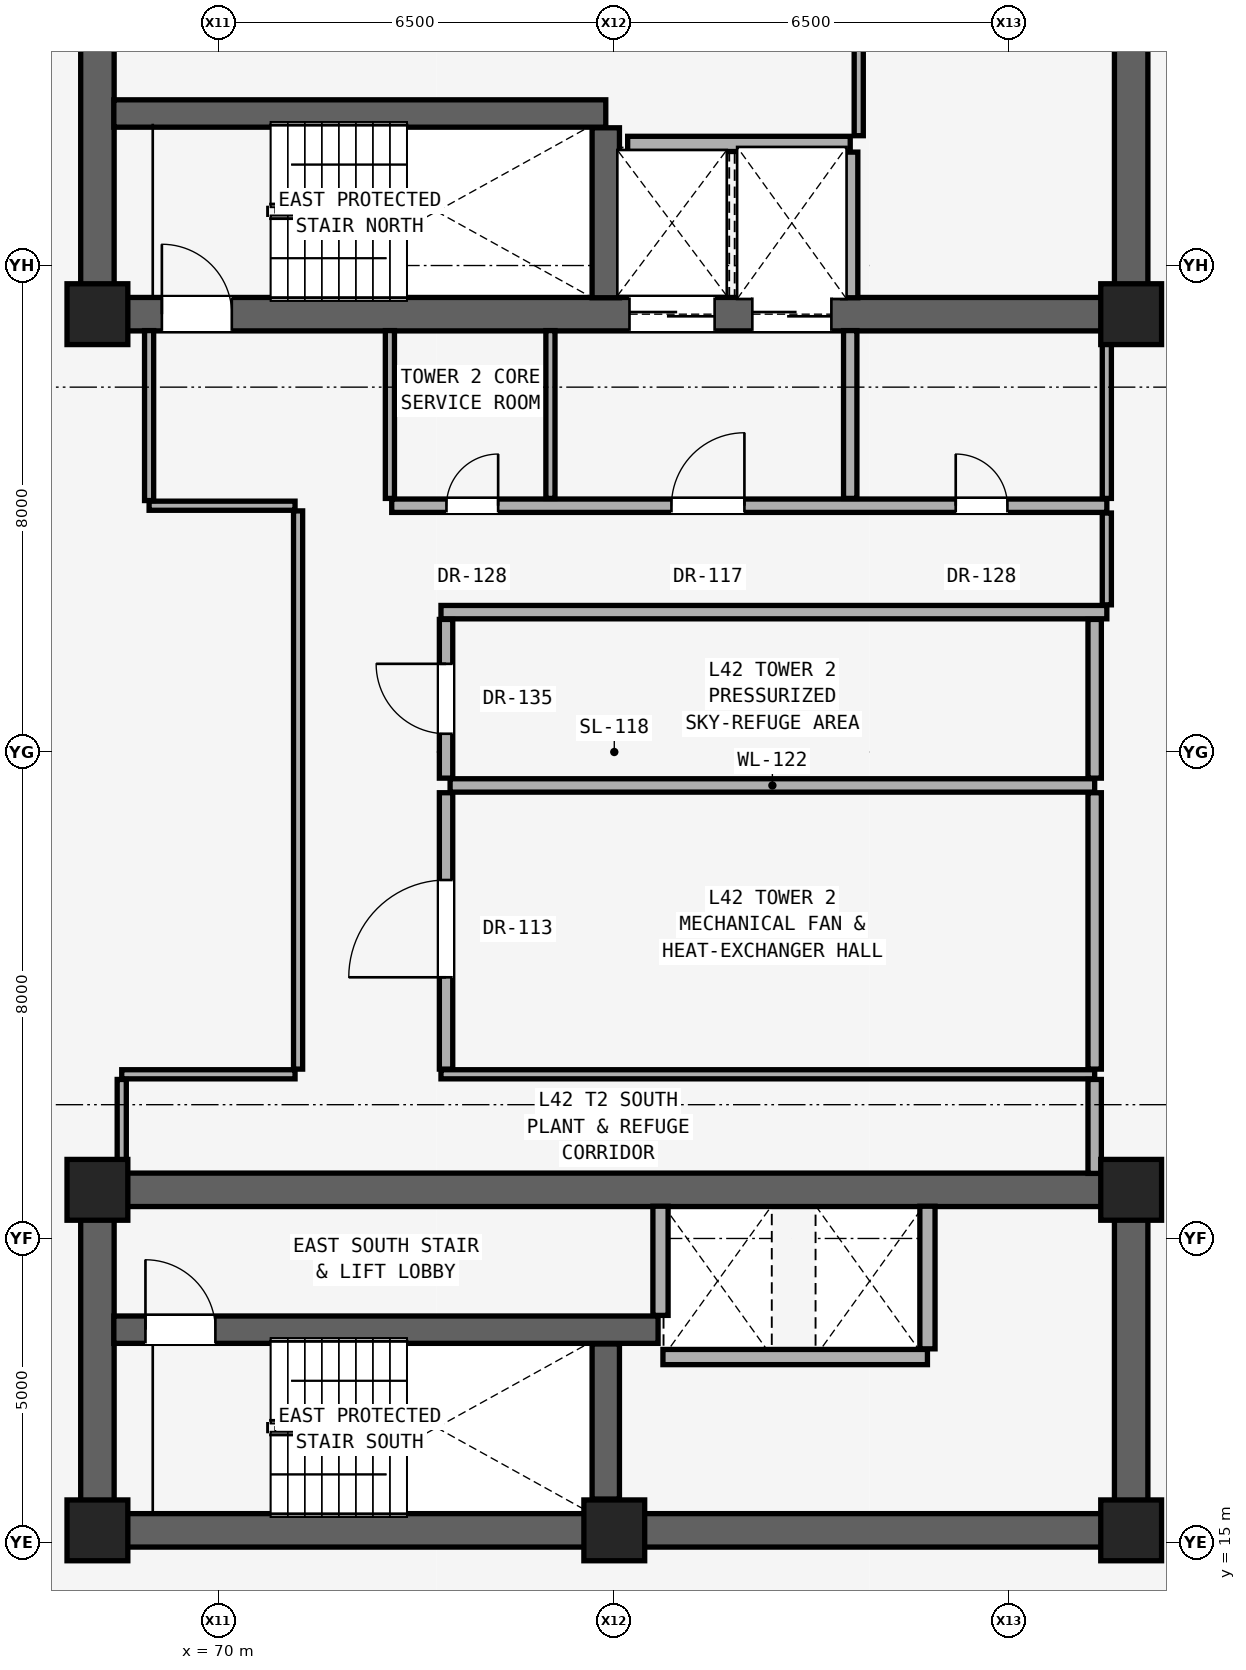
"""IFC4 building model, lengths in metres.
Left out: names, types, materials, properties, quantities, classifications, styles, units other than length and angle.
Written with IfcOpenShell. Run it as: python <this file> out.ifc"""

import sys

from ifc_helpers import new_model, si_unit, direction, frame, frame_2d, origin, origin_2d, place, context, subcontext, project, spatial, rectangle, extrude, element, fill, save


model = new_model("IFC4")
c1 = context("Model", 3, precision=1e-05, world=origin(), true_north=direction((0.0, 1.0)))
c2 = subcontext(c1, "Body", "Model", "MODEL_VIEW")
j1 = project(units=[si_unit("LENGTHUNIT", "METRE"), si_unit("PLANEANGLEUNIT", "RADIAN")], contexts=[c1])
p1 = place(None, origin())
s1 = spatial("IfcSite", under=j1, at=p1, CompositionType="ELEMENT")
p2 = place(p1, origin())
s2 = spatial("IfcBuilding", under=s1, at=p2, CompositionType="ELEMENT")
p3 = place(p2, frame((0.0, 0.0, 147.8)))
s3 = spatial("IfcBuildingStorey", under=s2, at=p3, CompositionType="ELEMENT", Elevation=147.8)
for number, where, z_axis, x_axis in (
    (1, (68.0, 15.2, 0.0), (0.0, 0.0, 1.0), (1.0, 0.0, 0.0)),
    (2, (76.5, 15.2, 0.0), (0.0, 0.0, 1.0), (1.0, 0.0, 0.0)),
    (3, (85.0, 15.2, 0.0), (0.0, 0.0, 1.0), (1.0, 0.0, 0.0)),
    (4, (68.0, 20.8, 0.0), (0.0, 0.0, 1.0), (1.0, 0.0, 0.0)),
    (5, (85.0, 20.8, 0.0), (0.0, 0.0, 1.0), (1.0, 0.0, 0.0)),
    (6, (68.0, 35.2, 0.0), (0.0, 0.0, 1.0), (1.0, 0.0, 0.0)),
    (7, (85.0, 35.2, 0.0), (0.0, 0.0, 1.0), (1.0, 0.0, 0.0)),
):
    element("IfcColumn", number, at=place(p3, frame(where, z_axis=z_axis, x_axis=x_axis)), inside=s3, PredefinedType="COLUMN", context=c2, shape_type="SweptSolid", body=[
        extrude(rectangle(XDim=1.0, YDim=1.0, at=origin_2d()), origin(), (0.0, 0.0, 1.0), 6.6),
    ])
for number, where, z_axis, x_axis in (
    (8, (68.0, 35.2, 0.0), (0.0, 0.0, 1.0), (0.0, 1.0, 0.0)),
    (9, (85.0, 35.2, 0.0), (0.0, 0.0, 1.0), (0.0, 1.0, 0.0)),
):
    element("IfcWall", number, at=place(p3, frame(where, z_axis=z_axis, x_axis=x_axis)), inside=s3, PredefinedType="SHEAR", context=c2, shape_type="SweptSolid", body=[
        extrude(rectangle(XDim=5.6, YDim=0.55, at=frame_2d((2.8, 0.0))), origin(), (0.0, 0.0, 1.0), 6.4),
    ])
p4 = place(p3, frame((68.0, 35.2, 0.0), z_axis=(0.0, 0.0, 1.0), x_axis=(1.0, 0.0, 0.0)))
e10 = element("IfcWall", 10, at=p4, inside=s3, PredefinedType="SHEAR", context=c2, shape_type="SweptSolid", body=[
    extrude(rectangle(XDim=17.0, YDim=0.55, at=frame_2d((8.5, 0.0))), origin(), (0.0, 0.0, 1.0), 6.4),
])
p5 = place(p4, frame((1.06, 0.0, 0.0)))
e11 = element("IfcOpeningElement", 11, at=p5, cuts=e10, PredefinedType="OPENING", context=c2, shape_type="SweptSolid", body=[
    extrude(rectangle(XDim=1.15, YDim=2.2, at=frame_2d((0.575, 1.1))), frame((0.0, 0.285, 0.0), z_axis=(0.0, -1.0, 0.0), x_axis=(1.0, 0.0, 0.0)), (0.0, 0.0, 1.0), 0.57),
])
p6 = place(p4, frame((8.75, 0.0, 0.0)))
e12 = element("IfcOpeningElement", 12, at=p6, cuts=e10, PredefinedType="OPENING", context=c2, shape_type="SweptSolid", body=[
    extrude(rectangle(XDim=1.4, YDim=2.35, at=frame_2d((0.7, 1.175))), frame((0.0, 0.285, 0.0), z_axis=(0.0, -1.0, 0.0), x_axis=(1.0, 0.0, 0.0)), (0.0, 0.0, 1.0), 0.57),
])
p7 = place(p4, frame((10.77, 0.0, 0.0)))
e13 = element("IfcOpeningElement", 13, at=p7, cuts=e10, PredefinedType="OPENING", context=c2, shape_type="SweptSolid", body=[
    extrude(rectangle(XDim=1.3, YDim=2.3, at=frame_2d((0.65, 1.15))), frame((0.0, 0.285, 0.0), z_axis=(0.0, -1.0, 0.0), x_axis=(1.0, 0.0, 0.0)), (0.0, 0.0, 1.0), 0.57),
])
p8 = place(p3, frame((68.0, 15.2, 0.0), z_axis=(0.0, 0.0, 1.0), x_axis=(1.0, 0.0, 0.0)))
e14 = element("IfcWall", 14, at=p8, inside=s3, PredefinedType="SHEAR", context=c2, shape_type="SweptSolid", body=[
    extrude(rectangle(XDim=17.0, YDim=0.55, at=frame_2d((8.5, 0.0))), origin(), (0.0, 0.0, 1.0), 6.4),
])
for number, where, z_axis, x_axis in (
    (15, (68.0, 15.2, 0.0), (0.0, 0.0, 1.0), (0.0, 1.0, 0.0)),
    (16, (85.0, 15.2, 0.0), (0.0, 0.0, 1.0), (0.0, 1.0, 0.0)),
):
    element("IfcWall", number, at=place(p3, frame(where, z_axis=z_axis, x_axis=x_axis)), inside=s3, PredefinedType="SHEAR", context=c2, shape_type="SweptSolid", body=[
        extrude(rectangle(XDim=5.6, YDim=0.55, at=frame_2d((2.8, 0.0))), origin(), (0.0, 0.0, 1.0), 6.4),
    ])
p9 = place(p3, frame((68.0, 20.8, 0.0), z_axis=(0.0, 0.0, 1.0), x_axis=(1.0, 0.0, 0.0)))
e17 = element("IfcWall", 17, at=p9, inside=s3, PredefinedType="SHEAR", context=c2, shape_type="SweptSolid", body=[
    extrude(rectangle(XDim=17.0, YDim=0.55, at=frame_2d((8.5, 0.0))), origin(), (0.0, 0.0, 1.0), 6.4),
])
p10 = place(p3, frame((77.3, 18.05, 0.0), z_axis=(0.0, 0.0, 1.0), x_axis=(1.0, 0.0, 0.0)))
e18 = element("IfcWall", 18, at=p10, inside=s3, PredefinedType="SOLIDWALL", context=c2, shape_type="SweptSolid", body=[
    extrude(rectangle(XDim=4.35, YDim=0.25, at=frame_2d((2.175, 0.0))), origin(), (0.0, 0.0, 1.0), 6.4),
])
p11 = place(p3, frame((68.27, 18.5, 0.0), z_axis=(0.0, 0.0, 1.0), x_axis=(1.0, 0.0, 0.0)))
e19 = element("IfcWall", 19, at=p11, inside=s3, PredefinedType="SHEAR", context=c2, shape_type="SweptSolid", body=[
    extrude(rectangle(XDim=8.95, YDim=0.45, at=frame_2d((4.475, 0.0))), origin(), (0.0, 0.0, 1.0), 6.4),
])
p12 = place(p11, frame((0.52, 0.0, 0.0)))
e20 = element("IfcOpeningElement", 20, at=p12, cuts=e19, PredefinedType="OPENING", context=c2, shape_type="SweptSolid", body=[
    extrude(rectangle(XDim=1.15, YDim=2.2, at=frame_2d((0.575, 1.1))), frame((0.0, 0.235, 0.0), z_axis=(0.0, -1.0, 0.0), x_axis=(1.0, 0.0, 0.0)), (0.0, 0.0, 1.0), 0.47),
])
p13 = place(p3, frame((68.4, 22.7, 0.0), z_axis=(0.0, 0.0, 1.0), x_axis=(1.0, 0.0, 0.0)))
e21 = element("IfcWall", 21, at=p13, inside=s3, PredefinedType="PARTITIONING", context=c2, shape_type="SweptSolid", body=[
    extrude(rectangle(XDim=2.85, YDim=0.15, at=frame_2d((1.425, 0.0))), origin(), (0.0, 0.0, 1.0), 6.4),
])
p14 = place(p3, frame((73.65, 22.7, 0.0), z_axis=(0.0, 0.0, 1.0), x_axis=(1.0, 0.0, 0.0)))
e22 = element("IfcWall", 22, at=p14, inside=s3, PredefinedType="PARTITIONING", context=c2, shape_type="SweptSolid", body=[
    extrude(rectangle(XDim=10.75, YDim=0.15, at=frame_2d((5.375, 0.0))), origin(), (0.0, 0.0, 1.0), 5.975),
])
p15 = place(p3, frame((73.8, 27.45, 0.0), z_axis=(0.0, 0.0, 1.0), x_axis=(1.0, 0.0, 0.0)))
e23 = element("IfcWall", 23, at=p15, inside=s3, PredefinedType="SOLIDWALL", context=c2, shape_type="SweptSolid", body=[
    extrude(rectangle(XDim=10.6, YDim=0.22, at=frame_2d((5.3, 0.0))), origin(), (0.0, 0.0, 1.0), 5.975),
])
p16 = place(p3, frame((73.65, 30.3, 0.0), z_axis=(0.0, 0.0, 1.0), x_axis=(1.0, 0.0, 0.0)))
e24 = element("IfcWall", 24, at=p16, inside=s3, PredefinedType="SOLIDWALL", context=c2, shape_type="SweptSolid", body=[
    extrude(rectangle(XDim=10.95, YDim=0.22, at=frame_2d((5.475, 0.0))), origin(), (0.0, 0.0, 1.0), 5.975),
])
p17 = place(p3, frame((68.85, 32.05, 0.0), z_axis=(0.0, 0.0, 1.0), x_axis=(1.0, 0.0, 0.0)))
e25 = element("IfcWall", 25, at=p17, inside=s3, PredefinedType="PARTITIONING", context=c2, shape_type="SweptSolid", body=[
    extrude(rectangle(XDim=2.4, YDim=0.15, at=frame_2d((1.2, 0.0))), origin(), (0.0, 0.0, 1.0), 6.4),
])
p18 = place(p3, frame((72.84, 32.05, 0.0), z_axis=(0.0, 0.0, 1.0), x_axis=(1.0, 0.0, 0.0)))
e26 = element("IfcWall", 26, at=p18, inside=s3, PredefinedType="SOLIDWALL", context=c2, shape_type="SweptSolid", body=[
    extrude(rectangle(XDim=11.76, YDim=0.22, at=frame_2d((5.88, 0.0))), origin(), (0.0, 0.0, 1.0), 5.975),
])
p19 = place(p18, frame((4.6, 0.0, 0.0)))
e27 = element("IfcOpeningElement", 27, at=p19, cuts=e26, PredefinedType="OPENING", context=c2, shape_type="SweptSolid", body=[
    extrude(rectangle(XDim=1.2, YDim=2.25, at=frame_2d((0.6, 1.125))), frame((0.0, 0.12, 0.0), z_axis=(0.0, -1.0, 0.0), x_axis=(1.0, 0.0, 0.0)), (0.0, 0.0, 1.0), 0.24),
])
p20 = place(p18, frame((9.275, 0.0, 0.0)))
e28 = element("IfcOpeningElement", 28, at=p20, cuts=e26, PredefinedType="OPENING", context=c2, shape_type="SweptSolid", body=[
    extrude(rectangle(XDim=0.85, YDim=2.01, at=frame_2d((0.425, 1.005))), frame((0.0, 0.12, 0.0), z_axis=(0.0, -1.0, 0.0), x_axis=(1.0, 0.0, 0.0)), (0.0, 0.0, 1.0), 0.24),
])
p21 = place(p18, frame((0.9, 0.0, 0.0)))
e29 = element("IfcOpeningElement", 29, at=p21, cuts=e26, PredefinedType="OPENING", context=c2, shape_type="SweptSolid", body=[
    extrude(rectangle(XDim=0.85, YDim=2.01, at=frame_2d((0.425, 1.005))), frame((0.0, 0.12, 0.0), z_axis=(0.0, -1.0, 0.0), x_axis=(1.0, 0.0, 0.0)), (0.0, 0.0, 1.0), 0.24),
])
p22 = place(p3, frame((76.72, 38.0, 0.0), z_axis=(0.0, 0.0, 1.0), x_axis=(1.0, 0.0, 0.0)))
e30 = element("IfcWall", 30, at=p22, inside=s3, PredefinedType="SOLIDWALL", context=c2, shape_type="SweptSolid", body=[
    extrude(rectangle(XDim=3.66, YDim=0.25, at=frame_2d((1.83, 0.0))), origin(), (0.0, 0.0, 1.0), 6.4),
])
p23 = place(p3, frame((68.27, 38.5, 0.0), z_axis=(0.0, 0.0, 1.0), x_axis=(1.0, 0.0, 0.0)))
e31 = element("IfcWall", 31, at=p23, inside=s3, PredefinedType="SHEAR", context=c2, shape_type="SweptSolid", body=[
    extrude(rectangle(XDim=8.09, YDim=0.45, at=frame_2d((4.045, 0.0))), origin(), (0.0, 0.0, 1.0), 6.4),
])
p24 = place(p3, frame((68.4, 21.07, 0.0), z_axis=(0.0, 0.0, 1.0), x_axis=(0.0, 1.0, 0.0)))
e32 = element("IfcWall", 32, at=p24, inside=s3, PredefinedType="PARTITIONING", context=c2, shape_type="SweptSolid", body=[
    extrude(rectangle(XDim=1.545, YDim=0.15, at=frame_2d((0.772, 0.0))), origin(), (0.0, 0.0, 1.0), 6.4),
])
p25 = place(p3, frame((68.85, 32.135, 0.0), z_axis=(0.0, 0.0, 1.0), x_axis=(0.0, 1.0, 0.0)))
e33 = element("IfcWall", 33, at=p25, inside=s3, PredefinedType="PARTITIONING", context=c2, shape_type="SweptSolid", body=[
    extrude(rectangle(XDim=2.795, YDim=0.15, at=frame_2d((1.397, 0.0))), origin(), (0.0, 0.0, 1.0), 6.4),
])
p26 = place(p3, frame((71.3, 22.785, 0.0), z_axis=(0.0, 0.0, 1.0), x_axis=(0.0, 1.0, 0.0)))
e34 = element("IfcWall", 34, at=p26, inside=s3, PredefinedType="PARTITIONING", context=c2, shape_type="SweptSolid", body=[
    extrude(rectangle(XDim=9.18, YDim=0.15, at=frame_2d((4.59, 0.0))), origin(), (0.0, 0.0, 1.0), 5.536),
])
p27 = place(p3, frame((72.81, 32.17, 0.0), z_axis=(0.0, 0.0, 1.0), x_axis=(0.0, 1.0, 0.0)))
e35 = element("IfcWall", 35, at=p27, inside=s3, PredefinedType="PARTITIONING", context=c2, shape_type="SweptSolid", body=[
    extrude(rectangle(XDim=2.76, YDim=0.15, at=frame_2d((1.38, 0.0))), origin(), (0.0, 0.0, 1.0), 6.4),
])
p28 = place(p3, frame((73.733, 22.785, 0.0), z_axis=(0.0, 0.0, 1.0), x_axis=(0.0, 1.0, 0.0)))
e36 = element("IfcWall", 36, at=p28, inside=s3, PredefinedType="SOLIDWALL", context=c2, shape_type="SweptSolid", body=[
    extrude(rectangle(XDim=4.545, YDim=0.22, at=frame_2d((2.272, 0.0))), origin(), (0.0, 0.0, 1.0), 6.4),
])
p29 = place(p28, frame((1.51, 0.0, 0.0)))
e37 = element("IfcOpeningElement", 37, at=p29, cuts=e36, PredefinedType="OPENING", context=c2, shape_type="SweptSolid", body=[
    extrude(rectangle(XDim=1.6, YDim=2.3, at=frame_2d((0.8, 1.15))), frame((0.0, 0.12, 0.0), z_axis=(0.0, -1.0, 0.0), x_axis=(1.0, 0.0, 0.0)), (0.0, 0.0, 1.0), 0.24),
])
p30 = place(p3, frame((73.733, 27.57, 0.0), z_axis=(0.0, 0.0, 1.0), x_axis=(0.0, 1.0, 0.0)))
e38 = element("IfcWall", 38, at=p30, inside=s3, PredefinedType="SOLIDWALL", context=c2, shape_type="SweptSolid", body=[
    extrude(rectangle(XDim=2.61, YDim=0.22, at=frame_2d((1.305, 0.0))), origin(), (0.0, 0.0, 1.0), 5.536),
])
p31 = place(p30, frame((0.73, 0.0, 0.0)))
e39 = element("IfcOpeningElement", 39, at=p31, cuts=e38, PredefinedType="OPENING", context=c2, shape_type="SweptSolid", body=[
    extrude(rectangle(XDim=1.15, YDim=2.2, at=frame_2d((0.575, 1.1))), frame((0.0, 0.12, 0.0), z_axis=(0.0, -1.0, 0.0), x_axis=(1.0, 0.0, 0.0)), (0.0, 0.0, 1.0), 0.24),
])
p32 = place(p3, frame((75.45, 32.17, 0.0), z_axis=(0.0, 0.0, 1.0), x_axis=(0.0, 1.0, 0.0)))
e40 = element("IfcWall", 40, at=p32, inside=s3, PredefinedType="PARTITIONING", context=c2, shape_type="SweptSolid", body=[
    extrude(rectangle(XDim=2.76, YDim=0.15, at=frame_2d((1.38, 0.0))), origin(), (0.0, 0.0, 1.0), 6.4),
])
p33 = place(p3, frame((76.36, 15.715, 0.0), z_axis=(0.0, 0.0, 1.0), x_axis=(0.0, 1.0, 0.0)))
e41 = element("IfcWall", 41, at=p33, inside=s3, PredefinedType="SHEAR", context=c2, shape_type="SweptSolid", body=[
    extrude(rectangle(XDim=2.55, YDim=0.45, at=frame_2d((1.275, 0.0))), origin(), (0.0, 0.0, 1.0), 6.4),
])
p34 = place(p3, frame((76.36, 35.47, 0.0), z_axis=(0.0, 0.0, 1.0), x_axis=(0.0, 1.0, 0.0)))
e42 = element("IfcWall", 42, at=p34, inside=s3, PredefinedType="SHEAR", context=c2, shape_type="SweptSolid", body=[
    extrude(rectangle(XDim=2.795, YDim=0.45, at=frame_2d((1.397, 0.0))), origin(), (0.0, 0.0, 1.0), 6.4),
])
p35 = place(p3, frame((77.26, 18.735, 0.0), z_axis=(0.0, 0.0, 1.0), x_axis=(0.0, 1.0, 0.0)))
e43 = element("IfcWall", 43, at=p35, inside=s3, PredefinedType="SOLIDWALL", context=c2, shape_type="SweptSolid", body=[
    extrude(rectangle(XDim=1.795, YDim=0.25, at=frame_2d((0.897, 0.0))), origin(), (0.0, 0.0, 1.0), 6.4),
])
p36 = place(p3, frame((80.38, 32.17, 0.0), z_axis=(0.0, 0.0, 1.0), x_axis=(0.0, 1.0, 0.0)))
e44 = element("IfcWall", 44, at=p36, inside=s3, PredefinedType="SOLIDWALL", context=c2, shape_type="SweptSolid", body=[
    extrude(rectangle(XDim=2.76, YDim=0.22, at=frame_2d((1.38, 0.0))), origin(), (0.0, 0.0, 1.0), 6.4),
])
p37 = place(p3, frame((80.38, 35.47, 0.0), z_axis=(0.0, 0.0, 1.0), x_axis=(0.0, 1.0, 0.0)))
e45 = element("IfcWall", 45, at=p37, inside=s3, PredefinedType="SOLIDWALL", context=c2, shape_type="SweptSolid", body=[
    extrude(rectangle(XDim=2.395, YDim=0.25, at=frame_2d((1.198, 0.0))), origin(), (0.0, 0.0, 1.0), 6.4),
])
p38 = place(p3, frame((80.52, 38.135, 0.0), z_axis=(0.0, 0.0, 1.0), x_axis=(0.0, 1.0, 0.0)))
e46 = element("IfcWall", 46, at=p38, inside=s3, PredefinedType="PARTITIONING", context=c2, shape_type="SweptSolid", body=[
    extrude(rectangle(XDim=2.265, YDim=0.15, at=frame_2d((1.132, 0.0))), origin(), (0.0, 0.0, 1.0), 6.4),
])
p39 = place(p3, frame((81.65, 18.185, 0.0), z_axis=(0.0, 0.0, 1.0), x_axis=(0.0, 1.0, 0.0)))
e47 = element("IfcWall", 47, at=p39, inside=s3, PredefinedType="SOLIDWALL", context=c2, shape_type="SweptSolid", body=[
    extrude(rectangle(XDim=2.345, YDim=0.25, at=frame_2d((1.172, 0.0))), origin(), (0.0, 0.0, 1.0), 6.4),
])
p40 = place(p3, frame((84.4, 21.07, 0.0), z_axis=(0.0, 0.0, 1.0), x_axis=(0.0, 1.0, 0.0)))
e48 = element("IfcWall", 48, at=p40, inside=s3, PredefinedType="SOLIDWALL", context=c2, shape_type="SweptSolid", body=[
    extrude(rectangle(XDim=1.545, YDim=0.22, at=frame_2d((0.772, 0.0))), origin(), (0.0, 0.0, 1.0), 6.4),
])
p41 = place(p3, frame((84.4, 22.785, 0.0), z_axis=(0.0, 0.0, 1.0), x_axis=(0.0, 1.0, 0.0)))
e49 = element("IfcWall", 49, at=p41, inside=s3, PredefinedType="SOLIDWALL", context=c2, shape_type="SweptSolid", body=[
    extrude(rectangle(XDim=4.545, YDim=0.22, at=frame_2d((2.272, 0.0))), origin(), (0.0, 0.0, 1.0), 6.4),
])
p42 = place(p3, frame((84.4, 27.57, 0.0), z_axis=(0.0, 0.0, 1.0), x_axis=(0.0, 1.0, 0.0)))
e50 = element("IfcWall", 50, at=p42, inside=s3, PredefinedType="SOLIDWALL", context=c2, shape_type="SweptSolid", body=[
    extrude(rectangle(XDim=2.61, YDim=0.22, at=frame_2d((1.305, 0.0))), origin(), (0.0, 0.0, 1.0), 5.536),
])
p43 = place(p3, frame((84.6, 30.42, 0.0), z_axis=(0.0, 0.0, 1.0), x_axis=(0.0, 1.0, 0.0)))
e51 = element("IfcWall", 51, at=p43, inside=s3, PredefinedType="PARTITIONING", context=c2, shape_type="SweptSolid", body=[
    extrude(rectangle(XDim=1.51, YDim=0.15, at=frame_2d((0.755, 0.0))), origin(), (0.0, 0.0, 1.0), 6.4),
])
p44 = place(p3, frame((84.6, 32.17, 0.0), z_axis=(0.0, 0.0, 1.0), x_axis=(0.0, 1.0, 0.0)))
e52 = element("IfcWall", 52, at=p44, inside=s3, PredefinedType="PARTITIONING", context=c2, shape_type="SweptSolid", body=[
    extrude(rectangle(XDim=2.76, YDim=0.15, at=frame_2d((1.38, 0.0))), origin(), (0.0, 0.0, 1.0), 6.4),
])
p45 = place(p5, origin())
e53 = element("IfcDoor", 53, at=p45, inside=s3, OperationType="SINGLE_SWING_LEFT", PredefinedType="DOOR", context=c2, shape_type="SweptSolid", body=[
    extrude(rectangle(XDim=1.15, YDim=2.2, at=frame_2d((0.575, 1.1))), frame((0.0, 0.025, 0.0), z_axis=(0.0, -1.0, 0.0), x_axis=(1.0, 0.0, 0.0)), (0.0, 0.0, 1.0), 0.05),
])
fill(e11, e53)
p46 = place(p19, origin())
e54 = element("IfcDoor", 54, at=p46, inside=s3, OperationType="SINGLE_SWING_RIGHT", PredefinedType="DOOR", context=c2, shape_type="SweptSolid", body=[
    extrude(rectangle(XDim=1.2, YDim=2.25, at=frame_2d((0.6, 1.125))), frame((0.0, 0.025, 0.0), z_axis=(0.0, -1.0, 0.0), x_axis=(1.0, 0.0, 0.0)), (0.0, 0.0, 1.0), 0.05),
])
fill(e27, e54)
p47 = place(p20, origin())
e55 = element("IfcDoor", 55, at=p47, inside=s3, OperationType="SINGLE_SWING_LEFT", PredefinedType="DOOR", context=c2, shape_type="SweptSolid", body=[
    extrude(rectangle(XDim=0.85, YDim=2.01, at=frame_2d((0.425, 1.005))), frame((0.0, 0.025, 0.0), z_axis=(0.0, -1.0, 0.0), x_axis=(1.0, 0.0, 0.0)), (0.0, 0.0, 1.0), 0.05),
])
fill(e28, e55)
p48 = place(p21, origin())
e56 = element("IfcDoor", 56, at=p48, inside=s3, OperationType="SINGLE_SWING_RIGHT", PredefinedType="DOOR", context=c2, shape_type="SweptSolid", body=[
    extrude(rectangle(XDim=0.85, YDim=2.01, at=frame_2d((0.425, 1.005))), frame((0.0, 0.025, 0.0), z_axis=(0.0, -1.0, 0.0), x_axis=(1.0, 0.0, 0.0)), (0.0, 0.0, 1.0), 0.05),
])
fill(e29, e56)
p49 = place(p12, origin())
e57 = element("IfcDoor", 57, at=p49, inside=s3, OperationType="SINGLE_SWING_LEFT", PredefinedType="DOOR", context=c2, shape_type="SweptSolid", body=[
    extrude(rectangle(XDim=1.15, YDim=2.2, at=frame_2d((0.575, 1.1))), frame((0.0, 0.025, 0.0), z_axis=(0.0, -1.0, 0.0), x_axis=(1.0, 0.0, 0.0)), (0.0, 0.0, 1.0), 0.05),
])
fill(e20, e57)
p50 = place(p31, origin())
e58 = element("IfcDoor", 58, at=p50, inside=s3, OperationType="SINGLE_SWING_RIGHT", PredefinedType="DOOR", context=c2, shape_type="SweptSolid", body=[
    extrude(rectangle(XDim=1.15, YDim=2.2, at=frame_2d((0.575, 1.1))), frame((0.0, 0.025, 0.0), z_axis=(0.0, -1.0, 0.0), x_axis=(1.0, 0.0, 0.0)), (0.0, 0.0, 1.0), 0.05),
])
fill(e39, e58)
p51 = place(p29, origin())
e59 = element("IfcDoor", 59, at=p51, inside=s3, OperationType="SINGLE_SWING_LEFT", PredefinedType="DOOR", context=c2, shape_type="SweptSolid", body=[
    extrude(rectangle(XDim=1.6, YDim=2.3, at=frame_2d((0.8, 1.15))), frame((0.0, 0.025, 0.0), z_axis=(0.0, -1.0, 0.0), x_axis=(1.0, 0.0, 0.0)), (0.0, 0.0, 1.0), 0.05),
])
fill(e37, e59)
p52 = place(p6, origin())
e60 = element("IfcDoor", 60, at=p52, inside=s3, OperationType="DOUBLE_DOOR_SLIDING", PredefinedType="DOOR", context=c2, shape_type="SweptSolid", body=[
    extrude(rectangle(XDim=1.4, YDim=2.35, at=frame_2d((0.7, 1.175))), frame((0.0, 0.025, 0.0), z_axis=(0.0, -1.0, 0.0), x_axis=(1.0, 0.0, 0.0)), (0.0, 0.0, 1.0), 0.05),
])
fill(e12, e60)
p53 = place(p7, origin())
e61 = element("IfcDoor", 61, at=p53, inside=s3, OperationType="DOUBLE_DOOR_SLIDING", PredefinedType="DOOR", context=c2, shape_type="SweptSolid", body=[
    extrude(rectangle(XDim=1.3, YDim=2.3, at=frame_2d((0.65, 1.15))), frame((0.0, 0.025, 0.0), z_axis=(0.0, -1.0, 0.0), x_axis=(1.0, 0.0, 0.0)), (0.0, 0.0, 1.0), 0.05),
])
fill(e13, e61)
save(model, sys.argv[1])
